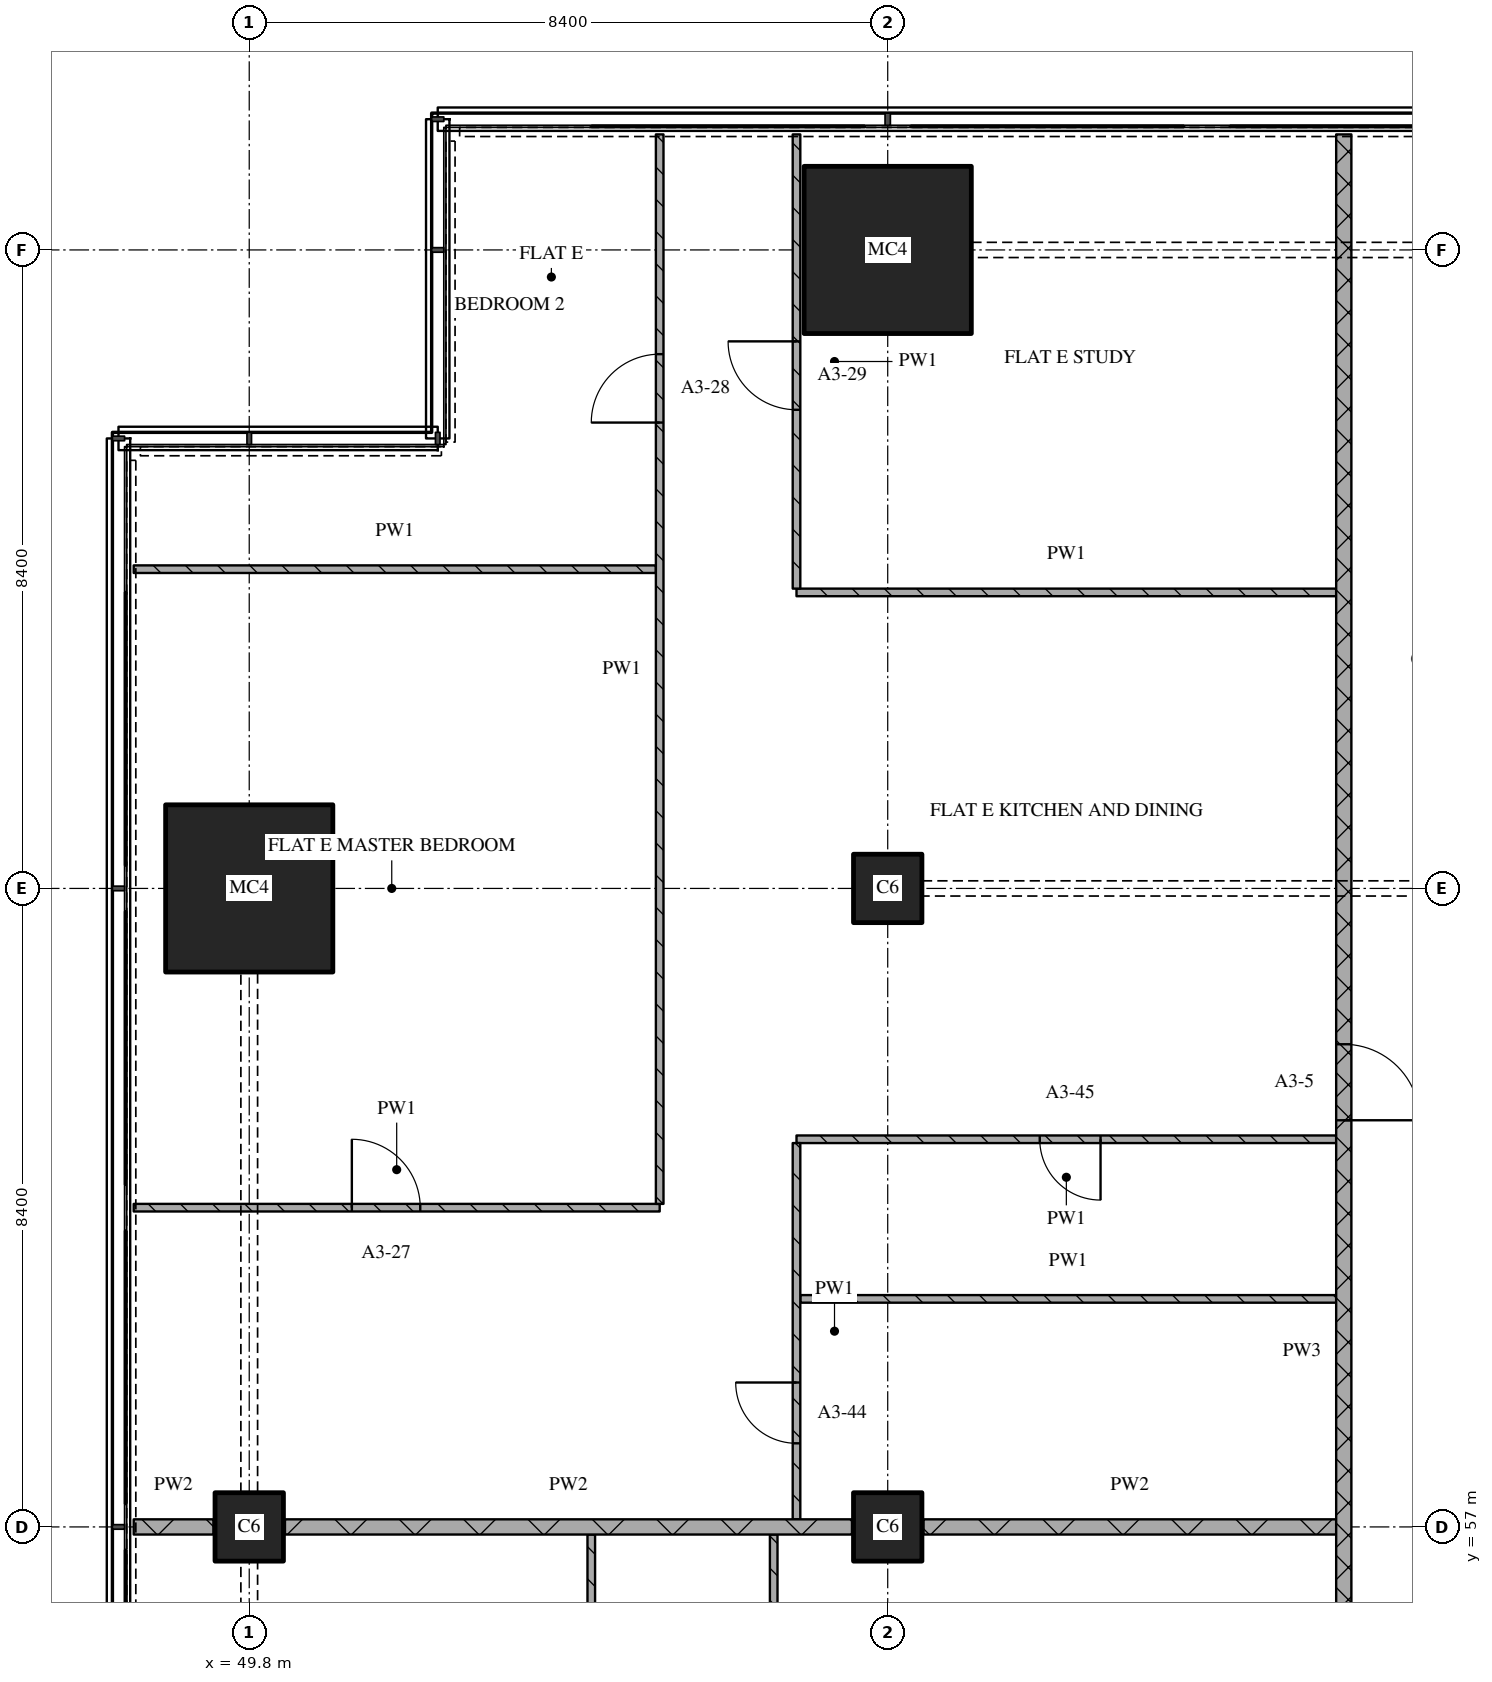
"""IFC4 building model, lengths in metres.
Left out: names, types, materials, properties, quantities, classifications, styles, units other than length and angle.
Written with IfcOpenShell. Run it as: python <this file> out.ifc"""

import sys

from ifc_helpers import new_model, si_unit, direction, frame, frame_2d, origin, origin_2d, place, context, subcontext, project, spatial, rectangle, extrude, element, fill, save


model = new_model("IFC4")
c1 = context("Model", 3, precision=1e-05, world=origin(), true_north=direction((0.0, 1.0)))
c2 = subcontext(c1, "Body", "Model", "MODEL_VIEW")
j1 = project(units=[si_unit("LENGTHUNIT", "METRE"), si_unit("PLANEANGLEUNIT", "RADIAN")], contexts=[c1])
p1 = place(None, origin())
s1 = spatial("IfcSite", under=j1, at=p1, CompositionType="ELEMENT")
p2 = place(p1, origin())
s2 = spatial("IfcBuilding", under=s1, at=p2, CompositionType="ELEMENT")
p3 = place(p2, frame((0.0, 0.0, 66.0)))
s3 = spatial("IfcBuildingStorey", under=s2, at=p3, CompositionType="ELEMENT", Elevation=66.0)
p4 = place(p3, frame((49.8, 57.0, 0.0), z_axis=(0.0, 0.0, 1.0), x_axis=(1.0, 0.0, 0.0)))
e1 = element("IfcColumn", 1, at=p4, inside=s3, PredefinedType="COLUMN", context=c2, shape_type="SweptSolid", body=[
    extrude(rectangle(XDim=0.9, YDim=0.9, at=origin_2d()), origin(), (0.0, 0.0, 1.0), 3.6),
])
p5 = place(p3, frame((49.8, 65.4, 0.0), z_axis=(0.0, 0.0, 1.0), x_axis=(1.0, 0.0, 0.0)))
e2 = element("IfcColumn", 2, at=p5, inside=s3, PredefinedType="COLUMN", context=c2, shape_type="SweptSolid", body=[
    extrude(rectangle(XDim=2.2, YDim=2.2, at=origin_2d()), origin(), (0.0, 0.0, 1.0), 3.6),
])
for number, where, z_axis, x_axis in (
    (3, (58.2, 57.0, 0.0), (0.0, 0.0, 1.0), (1.0, 0.0, 0.0)),
    (4, (58.2, 65.4, 0.0), (0.0, 0.0, 1.0), (1.0, 0.0, 0.0)),
):
    element("IfcColumn", number, at=place(p3, frame(where, z_axis=z_axis, x_axis=x_axis)), inside=s3, PredefinedType="COLUMN", context=c2, shape_type="SweptSolid", body=[
        extrude(rectangle(XDim=0.9, YDim=0.9, at=origin_2d()), origin(), (0.0, 0.0, 1.0), 3.6),
    ])
p6 = place(p3, frame((58.2, 73.8, 0.0), z_axis=(0.0, 0.0, 1.0), x_axis=(1.0, 0.0, 0.0)))
e5 = element("IfcColumn", 5, at=p6, inside=s3, PredefinedType="COLUMN", context=c2, shape_type="SweptSolid", body=[
    extrude(rectangle(XDim=2.2, YDim=2.2, at=origin_2d()), origin(), (0.0, 0.0, 1.0), 3.6),
])
p7 = place(p3, frame((48.28, 57.0, 0.0), z_axis=(0.0, 0.0, 1.0), x_axis=(1.0, 0.0, 0.0)))
e6 = element("IfcWall", 6, at=p7, inside=s3, PredefinedType="PARTITIONING", context=c2, shape_type="SweptSolid", body=[
    extrude(rectangle(XDim=1.05, YDim=0.2, at=frame_2d((0.525, 0.0))), origin(), (0.0, 0.0, 1.0), 3.32),
])
p8 = place(p3, frame((50.27, 57.0, 0.0), z_axis=(0.0, 0.0, 1.0), x_axis=(1.0, 0.0, 0.0)))
e7 = element("IfcWall", 7, at=p8, inside=s3, PredefinedType="PARTITIONING", context=c2, shape_type="SweptSolid", body=[
    extrude(rectangle(XDim=7.46, YDim=0.2, at=frame_2d((3.73, 0.0))), origin(), (0.0, 0.0, 1.0), 3.32),
])
p9 = place(p3, frame((58.67, 57.0, 0.0), z_axis=(0.0, 0.0, 1.0), x_axis=(1.0, 0.0, 0.0)))
e8 = element("IfcWall", 8, at=p9, inside=s3, PredefinedType="PARTITIONING", context=c2, shape_type="SweptSolid", body=[
    extrude(rectangle(XDim=5.43, YDim=0.2, at=frame_2d((2.715, 0.0))), origin(), (0.0, 0.0, 1.0), 3.32),
])
p10 = place(p3, frame((57.05, 60.0, 0.0), z_axis=(0.0, 0.0, 1.0), x_axis=(1.0, 0.0, 0.0)))
e9 = element("IfcWall", 9, at=p10, inside=s3, PredefinedType="PARTITIONING", context=c2, shape_type="SweptSolid", body=[
    extrude(rectangle(XDim=7.05, YDim=0.1, at=frame_2d((3.525, 0.0))), origin(), (0.0, 0.0, 1.0), 3.32),
])
p11 = place(p3, frame((48.28, 61.2, 0.0), z_axis=(0.0, 0.0, 1.0), x_axis=(1.0, 0.0, 0.0)))
e10 = element("IfcWall", 10, at=p11, inside=s3, PredefinedType="PARTITIONING", context=c2, shape_type="SweptSolid", body=[
    extrude(rectangle(XDim=6.92, YDim=0.1, at=frame_2d((3.46, 0.0))), origin(), (0.0, 0.0, 1.0), 3.32),
])
p12 = place(p11, frame((2.87, 0.0, 0.0)))
e11 = element("IfcOpeningElement", 11, at=p12, cuts=e10, PredefinedType="OPENING", context=c2, shape_type="SweptSolid", body=[
    extrude(rectangle(XDim=0.9, YDim=2.1, at=frame_2d((0.45, 1.05))), frame((0.0, 0.06, 0.0), z_axis=(0.0, -1.0, 0.0), x_axis=(1.0, 0.0, 0.0)), (0.0, 0.0, 1.0), 0.12),
])
p13 = place(p3, frame((64.1, 62.1, 0.0), z_axis=(0.0, 0.0, 1.0), x_axis=(-1.0, 0.0, 0.0)))
e12 = element("IfcWall", 12, at=p13, inside=s3, PredefinedType="PARTITIONING", context=c2, shape_type="SweptSolid", body=[
    extrude(rectangle(XDim=7.1, YDim=0.1, at=frame_2d((3.55, 0.0))), origin(), (0.0, 0.0, 1.0), 3.32),
])
p14 = place(p13, frame((3.1, 0.0, 0.0)))
e13 = element("IfcOpeningElement", 13, at=p14, cuts=e12, PredefinedType="OPENING", context=c2, shape_type="SweptSolid", body=[
    extrude(rectangle(XDim=0.8, YDim=2.1, at=frame_2d((0.4, 1.05))), frame((0.0, 0.06, 0.0), z_axis=(0.0, -1.0, 0.0), x_axis=(1.0, 0.0, 0.0)), (0.0, 0.0, 1.0), 0.12),
])
p15 = place(p3, frame((57.0, 69.294, 0.0), z_axis=(0.0, 0.0, 1.0), x_axis=(1.0, 0.0, 0.0)))
e14 = element("IfcWall", 14, at=p15, inside=s3, PredefinedType="PARTITIONING", context=c2, shape_type="SweptSolid", body=[
    extrude(rectangle(XDim=7.1, YDim=0.1, at=frame_2d((3.55, 0.0))), origin(), (0.0, 0.0, 1.0), 3.32),
])
p16 = place(p3, frame((48.28, 69.6, 0.0), z_axis=(0.0, 0.0, 1.0), x_axis=(1.0, 0.0, 0.0)))
e15 = element("IfcWall", 15, at=p16, inside=s3, PredefinedType="PARTITIONING", context=c2, shape_type="SweptSolid", body=[
    extrude(rectangle(XDim=6.87, YDim=0.1, at=frame_2d((3.435, 0.0))), origin(), (0.0, 0.0, 1.0), 3.32),
])
p17 = place(p3, frame((54.3, 56.9, 0.0), z_axis=(0.0, 0.0, 1.0), x_axis=(0.0, -1.0, 0.0)))
e16 = element("IfcWall", 16, at=p17, inside=s3, PredefinedType="PARTITIONING", context=c2, shape_type="SweptSolid", body=[
    extrude(rectangle(XDim=8.25, YDim=0.1, at=frame_2d((4.125, 0.0))), origin(), (0.0, 0.0, 1.0), 3.32),
])
p18 = place(p3, frame((55.2, 61.25, 0.0), z_axis=(0.0, 0.0, 1.0), x_axis=(0.0, 1.0, 0.0)))
e17 = element("IfcWall", 17, at=p18, inside=s3, PredefinedType="PARTITIONING", context=c2, shape_type="SweptSolid", body=[
    extrude(rectangle(XDim=14.07, YDim=0.1, at=frame_2d((7.035, 0.0))), origin(), (0.0, 0.0, 1.0), 3.32),
])
p19 = place(p18, frame((10.279, 0.0, 0.0)))
e18 = element("IfcOpeningElement", 18, at=p19, cuts=e17, PredefinedType="OPENING", context=c2, shape_type="SweptSolid", body=[
    extrude(rectangle(XDim=0.9, YDim=2.1, at=frame_2d((0.45, 1.05))), frame((0.0, 0.06, 0.0), z_axis=(0.0, -1.0, 0.0), x_axis=(1.0, 0.0, 0.0)), (0.0, 0.0, 1.0), 0.12),
])
p20 = place(p3, frame((56.7, 56.9, 0.0), z_axis=(0.0, 0.0, 1.0), x_axis=(0.0, -1.0, 0.0)))
e19 = element("IfcWall", 19, at=p20, inside=s3, PredefinedType="PARTITIONING", context=c2, shape_type="SweptSolid", body=[
    extrude(rectangle(XDim=3.15, YDim=0.1, at=frame_2d((1.575, 0.0))), origin(), (0.0, 0.0, 1.0), 3.32),
])
p21 = place(p3, frame((57.0, 62.05, 0.0), z_axis=(0.0, 0.0, 1.0), x_axis=(0.0, -1.0, 0.0)))
e20 = element("IfcWall", 20, at=p21, inside=s3, PredefinedType="PARTITIONING", context=c2, shape_type="SweptSolid", body=[
    extrude(rectangle(XDim=4.95, YDim=0.1, at=frame_2d((2.475, 0.0))), origin(), (0.0, 0.0, 1.0), 3.32),
])
p22 = place(p21, frame((3.15, 0.0, 0.0)))
e21 = element("IfcOpeningElement", 21, at=p22, cuts=e20, PredefinedType="OPENING", context=c2, shape_type="SweptSolid", body=[
    extrude(rectangle(XDim=0.8, YDim=2.1, at=frame_2d((0.4, 1.05))), frame((0.0, 0.06, 0.0), z_axis=(0.0, -1.0, 0.0), x_axis=(1.0, 0.0, 0.0)), (0.0, 0.0, 1.0), 0.12),
])
p23 = place(p3, frame((57.0, 75.32, 0.0), z_axis=(0.0, 0.0, 1.0), x_axis=(0.0, -1.0, 0.0)))
e22 = element("IfcWall", 22, at=p23, inside=s3, PredefinedType="PARTITIONING", context=c2, shape_type="SweptSolid", body=[
    extrude(rectangle(XDim=5.976, YDim=0.1, at=frame_2d((2.988, 0.0))), origin(), (0.0, 0.0, 1.0), 3.32),
])
p24 = place(p23, frame((2.723, 0.0, 0.0)))
e23 = element("IfcOpeningElement", 23, at=p24, cuts=e22, PredefinedType="OPENING", context=c2, shape_type="SweptSolid", body=[
    extrude(rectangle(XDim=0.9, YDim=2.1, at=frame_2d((0.45, 1.05))), frame((0.0, 0.06, 0.0), z_axis=(0.0, -1.0, 0.0), x_axis=(1.0, 0.0, 0.0)), (0.0, 0.0, 1.0), 0.12),
])
p25 = place(p3, frame((64.2, 43.3, 0.0), z_axis=(0.0, 0.0, 1.0), x_axis=(0.0, 1.0, 0.0)))
e24 = element("IfcWall", 24, at=p25, inside=s3, PredefinedType="PARTITIONING", context=c2, shape_type="SweptSolid", body=[
    extrude(rectangle(XDim=32.02, YDim=0.2, at=frame_2d((16.01, 0.0))), origin(), (0.0, 0.0, 1.0), 3.32),
])
p26 = place(p25, frame((9.15, 0.0, 0.0)))
e25 = element("IfcOpeningElement", 25, at=p26, cuts=e24, PredefinedType="OPENING", context=c2, shape_type="SweptSolid", body=[
    extrude(rectangle(XDim=1.0, YDim=2.1, at=frame_2d((0.5, 1.05))), frame((0.0, 0.11, 0.0), z_axis=(0.0, -1.0, 0.0), x_axis=(1.0, 0.0, 0.0)), (0.0, 0.0, 1.0), 0.22),
])
p27 = place(p25, frame((19.05, 0.0, 0.0)))
e26 = element("IfcOpeningElement", 26, at=p27, cuts=e24, PredefinedType="OPENING", context=c2, shape_type="SweptSolid", body=[
    extrude(rectangle(XDim=1.0, YDim=2.1, at=frame_2d((0.5, 1.05))), frame((0.0, 0.11, 0.0), z_axis=(0.0, -1.0, 0.0), x_axis=(1.0, 0.0, 0.0)), (0.0, 0.0, 1.0), 0.22),
])
p28 = place(p12, origin())
e27 = element("IfcDoor", 27, at=p28, inside=s3, OperationType="SINGLE_SWING_LEFT", PredefinedType="DOOR", context=c2, shape_type="SweptSolid", body=[
    extrude(rectangle(XDim=0.9, YDim=2.1, at=frame_2d((0.45, 1.05))), frame((0.0, 0.025, 0.0), z_axis=(0.0, -1.0, 0.0), x_axis=(1.0, 0.0, 0.0)), (0.0, 0.0, 1.0), 0.05),
])
fill(e11, e27)
p29 = place(p14, origin())
e28 = element("IfcDoor", 28, at=p29, inside=s3, OperationType="SINGLE_SWING_LEFT", PredefinedType="DOOR", context=c2, shape_type="SweptSolid", body=[
    extrude(rectangle(XDim=0.8, YDim=2.1, at=frame_2d((0.4, 1.05))), frame((0.0, 0.025, 0.0), z_axis=(0.0, -1.0, 0.0), x_axis=(1.0, 0.0, 0.0)), (0.0, 0.0, 1.0), 0.05),
])
fill(e13, e28)
p30 = place(p19, origin())
e29 = element("IfcDoor", 29, at=p30, inside=s3, OperationType="SINGLE_SWING_LEFT", PredefinedType="DOOR", context=c2, shape_type="SweptSolid", body=[
    extrude(rectangle(XDim=0.9, YDim=2.1, at=frame_2d((0.45, 1.05))), frame((0.0, 0.025, 0.0), z_axis=(0.0, -1.0, 0.0), x_axis=(1.0, 0.0, 0.0)), (0.0, 0.0, 1.0), 0.05),
])
fill(e18, e29)
p31 = place(p22, origin())
e30 = element("IfcDoor", 30, at=p31, inside=s3, OperationType="SINGLE_SWING_RIGHT", PredefinedType="DOOR", context=c2, shape_type="SweptSolid", body=[
    extrude(rectangle(XDim=0.8, YDim=2.1, at=frame_2d((0.4, 1.05))), frame((0.0, 0.025, 0.0), z_axis=(0.0, -1.0, 0.0), x_axis=(1.0, 0.0, 0.0)), (0.0, 0.0, 1.0), 0.05),
])
fill(e21, e30)
p32 = place(p24, origin())
e31 = element("IfcDoor", 31, at=p32, inside=s3, OperationType="SINGLE_SWING_RIGHT", PredefinedType="DOOR", context=c2, shape_type="SweptSolid", body=[
    extrude(rectangle(XDim=0.9, YDim=2.1, at=frame_2d((0.45, 1.05))), frame((0.0, 0.025, 0.0), z_axis=(0.0, -1.0, 0.0), x_axis=(1.0, 0.0, 0.0)), (0.0, 0.0, 1.0), 0.05),
])
fill(e23, e31)
p33 = place(p27, origin())
e32 = element("IfcDoor", 32, at=p33, inside=s3, OperationType="SINGLE_SWING_RIGHT", PredefinedType="DOOR", context=c2, shape_type="SweptSolid", body=[
    extrude(rectangle(XDim=1.0, YDim=2.1, at=frame_2d((0.5, 1.05))), frame((0.0, 0.025, 0.0), z_axis=(0.0, -1.0, 0.0), x_axis=(1.0, 0.0, 0.0)), (0.0, 0.0, 1.0), 0.05),
])
fill(e26, e32)
save(model, sys.argv[1])
